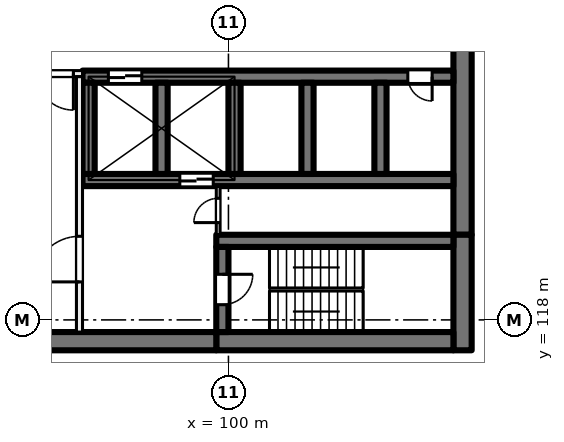
"""IFC4 building model, lengths in metres.
Left out: names, types, materials, properties, quantities, classifications, styles, units other than length and angle.
Written with IfcOpenShell. Run it as: python <this file> out.ifc"""

import sys

from ifc_helpers import new_model, si_unit, direction, frame, frame_2d, origin, place, context, subcontext, project, spatial, rectangle, extrude, element, fill, save


model = new_model("IFC4")
c1 = context("Model", 3, precision=1e-05, world=origin(), true_north=direction((0.0, 1.0)))
c2 = subcontext(c1, "Body", "Model", "MODEL_VIEW")
j1 = project(units=[si_unit("LENGTHUNIT", "METRE"), si_unit("PLANEANGLEUNIT", "RADIAN")], contexts=[c1])
p1 = place(None, origin())
s1 = spatial("IfcSite", under=j1, at=p1, CompositionType="ELEMENT")
p2 = place(p1, origin())
s2 = spatial("IfcBuilding", under=s1, at=p2, CompositionType="ELEMENT")
p3 = place(p2, frame((0.0, 0.0, 55.5)))
s3 = spatial("IfcBuildingStorey", under=s2, at=p3, CompositionType="ELEMENT", Elevation=55.5)
p4 = place(p3, frame((107.7, 135.2, 0.0), z_axis=(0.0, 0.0, 1.0), x_axis=(0.0, -1.0, 0.0)))
e1 = element("IfcWall", 1, at=p4, inside=s3, PredefinedType="SHEAR", context=c2, shape_type="SweptSolid", body=[
    extrude(rectangle(XDim=14.4, YDim=0.6, at=frame_2d((7.2, 0.0))), origin(), (0.0, 0.0, 1.0), 4.0),
])
p5 = place(p3, frame((107.7, 120.8, 0.0), z_axis=(0.0, 0.0, 1.0), x_axis=(0.0, -1.0, 0.0)))
e2 = element("IfcWall", 2, at=p5, inside=s3, PredefinedType="SHEAR", context=c2, shape_type="SweptSolid", body=[
    extrude(rectangle(XDim=3.8, YDim=0.6, at=frame_2d((1.9, 0.0))), origin(), (0.0, 0.0, 1.0), 4.0),
])
p6 = place(p3, frame((107.4, 117.3, 0.0), z_axis=(0.0, 0.0, 1.0), x_axis=(-1.0, 0.0, 0.0)))
e3 = element("IfcWall", 3, at=p6, inside=s3, PredefinedType="SHEAR", context=c2, shape_type="SweptSolid", body=[
    extrude(rectangle(XDim=7.8, YDim=0.6, at=frame_2d((3.9, 0.0))), origin(), (0.0, 0.0, 1.0), 4.0),
])
p7 = place(p3, frame((99.6, 117.3, 0.0), z_axis=(0.0, 0.0, 1.0), x_axis=(-1.0, 0.0, 0.0)))
e4 = element("IfcWall", 4, at=p7, inside=s3, PredefinedType="SHEAR", context=c2, shape_type="SweptSolid", body=[
    extrude(rectangle(XDim=8.9, YDim=0.6, at=frame_2d((4.45, 0.0))), origin(), (0.0, 0.0, 1.0), 4.0),
])
p8 = place(p3, frame((107.4, 120.6, 0.0), z_axis=(0.0, 0.0, 1.0), x_axis=(-1.0, 0.0, 0.0)))
e5 = element("IfcWall", 5, at=p8, inside=s3, PredefinedType="SHEAR", context=c2, shape_type="SweptSolid", body=[
    extrude(rectangle(XDim=7.8, YDim=0.4, at=frame_2d((3.9, 0.0))), origin(), (0.0, 0.0, 1.0), 4.0),
])
p9 = place(p3, frame((99.8, 120.4, 0.0), z_axis=(0.0, 0.0, 1.0), x_axis=(0.0, -1.0, 0.0)))
e6 = element("IfcWall", 6, at=p9, inside=s3, PredefinedType="SHEAR", context=c2, shape_type="SweptSolid", body=[
    extrude(rectangle(XDim=2.8, YDim=0.4, at=frame_2d((1.4, 0.0))), origin(), (0.0, 0.0, 1.0), 4.0),
])
p10 = place(p9, frame((0.9, 0.0, 0.0)))
e7 = element("IfcOpeningElement", 7, at=p10, cuts=e6, PredefinedType="OPENING", context=c2, shape_type="SweptSolid", body=[
    extrude(rectangle(XDim=1.0, YDim=2.1, at=frame_2d((0.5, 1.05))), frame((0.0, 0.21, 0.0), z_axis=(0.0, -1.0, 0.0), x_axis=(1.0, 0.0, 0.0)), (0.0, 0.0, 1.0), 0.42),
])
p11 = place(p3, frame((107.4, 126.0, 0.0), z_axis=(0.0, 0.0, 1.0), x_axis=(-1.0, 0.0, 0.0)))
e8 = element("IfcWall", 8, at=p11, inside=s3, PredefinedType="SHEAR", context=c2, shape_type="SweptSolid", body=[
    extrude(rectangle(XDim=12.2, YDim=0.4, at=frame_2d((6.1, 0.0))), origin(), (0.0, 0.0, 1.0), 4.0),
])
p12 = place(p11, frame((10.25, 0.0, 0.0)))
e9 = element("IfcOpeningElement", 9, at=p12, cuts=e8, PredefinedType="OPENING", context=c2, shape_type="SweptSolid", body=[
    extrude(rectangle(XDim=1.1, YDim=2.1, at=frame_2d((0.55, 1.05))), frame((0.0, 0.21, 0.0), z_axis=(0.0, -1.0, 0.0), x_axis=(1.0, 0.0, 0.0)), (0.0, 0.0, 1.0), 0.42),
])
p13 = place(p11, frame((0.7, 0.0, 0.0)))
e10 = element("IfcOpeningElement", 10, at=p13, cuts=e8, PredefinedType="OPENING", context=c2, shape_type="SweptSolid", body=[
    extrude(rectangle(XDim=0.8, YDim=2.1, at=frame_2d((0.4, 1.05))), frame((0.0, 0.21, 0.0), z_axis=(0.0, -1.0, 0.0), x_axis=(1.0, 0.0, 0.0)), (0.0, 0.0, 1.0), 0.42),
])
p14 = place(p3, frame((107.4, 122.6, 0.0), z_axis=(0.0, 0.0, 1.0), x_axis=(-1.0, 0.0, 0.0)))
e11 = element("IfcWall", 11, at=p14, inside=s3, PredefinedType="SHEAR", context=c2, shape_type="SweptSolid", body=[
    extrude(rectangle(XDim=12.2, YDim=0.4, at=frame_2d((6.1, 0.0))), origin(), (0.0, 0.0, 1.0), 4.0),
])
p15 = place(p14, frame((7.9, 0.0, 0.0)))
e12 = element("IfcOpeningElement", 12, at=p15, cuts=e11, PredefinedType="OPENING", context=c2, shape_type="SweptSolid", body=[
    extrude(rectangle(XDim=1.1, YDim=2.1, at=frame_2d((0.55, 1.05))), frame((0.0, 0.21, 0.0), z_axis=(0.0, -1.0, 0.0), x_axis=(1.0, 0.0, 0.0)), (0.0, 0.0, 1.0), 0.42),
])
for number, where, z_axis, x_axis in (
    (13, (105.0, 125.8, 0.0), (0.0, 0.0, 1.0), (0.0, -1.0, 0.0)),
    (14, (102.6, 125.8, 0.0), (0.0, 0.0, 1.0), (0.0, -1.0, 0.0)),
    (15, (100.2, 125.8, 0.0), (0.0, 0.0, 1.0), (0.0, -1.0, 0.0)),
    (16, (97.8, 125.8, 0.0), (0.0, 0.0, 1.0), (0.0, -1.0, 0.0)),
    (17, (95.4, 125.8, 0.0), (0.0, 0.0, 1.0), (0.0, -1.0, 0.0)),
):
    element("IfcWall", number, at=place(p3, frame(where, z_axis=z_axis, x_axis=x_axis)), inside=s3, PredefinedType="SHEAR", context=c2, shape_type="SweptSolid", body=[
        extrude(rectangle(XDim=3.0, YDim=0.4, at=frame_2d((1.5, 0.0))), origin(), (0.0, 0.0, 1.0), 4.0),
    ])
p16 = place(p3, frame((95.2, 126.1, 0.0), z_axis=(0.0, 0.0, 1.0), x_axis=(-1.0, 0.0, 0.0)))
e18 = element("IfcWall", 18, at=p16, inside=s3, PredefinedType="PARTITIONING", context=c2, shape_type="SweptSolid", body=[
    extrude(rectangle(XDim=3.8, YDim=0.2, at=frame_2d((1.9, 0.0))), origin(), (0.0, 0.0, 1.0), 3.625),
])
p17 = place(p16, frame((0.3, 0.0, 0.0)))
e19 = element("IfcOpeningElement", 19, at=p17, cuts=e18, PredefinedType="OPENING", context=c2, shape_type="SweptSolid", body=[
    extrude(rectangle(XDim=1.2, YDim=2.1, at=frame_2d((0.6, 1.05))), frame((0.0, 0.11, 0.0), z_axis=(0.0, -1.0, 0.0), x_axis=(1.0, 0.0, 0.0)), (0.0, 0.0, 1.0), 0.22),
])
p18 = place(p3, frame((95.1, 117.6, 0.0), z_axis=(0.0, 0.0, 1.0), x_axis=(0.0, 1.0, 0.0)))
e20 = element("IfcWall", 20, at=p18, inside=s3, PredefinedType="PARTITIONING", context=c2, shape_type="SweptSolid", body=[
    extrude(rectangle(XDim=8.4, YDim=0.2, at=frame_2d((4.2, 0.0))), origin(), (0.0, 0.0, 1.0), 3.625),
])
p19 = place(p18, frame((1.65, 0.0, 0.0)))
e21 = element("IfcOpeningElement", 21, at=p19, cuts=e20, PredefinedType="OPENING", context=c2, shape_type="SweptSolid", body=[
    extrude(rectangle(XDim=1.5, YDim=2.1, at=frame_2d((0.75, 1.05))), frame((0.0, 0.11, 0.0), z_axis=(0.0, -1.0, 0.0), x_axis=(1.0, 0.0, 0.0)), (0.0, 0.0, 1.0), 0.22),
])
p20 = place(p3, frame((99.663, 120.8, 0.0), z_axis=(0.0, 0.0, 1.0), x_axis=(0.0, 1.0, 0.0)))
e22 = element("IfcWall", 22, at=p20, inside=s3, PredefinedType="PARTITIONING", context=c2, shape_type="SweptSolid", body=[
    extrude(rectangle(XDim=1.6, YDim=0.125, at=frame_2d((0.8, 0.0))), origin(), (0.0, 0.0, 1.0), 3.625),
])
p21 = place(p20, frame((0.4, 0.0, 0.0)))
e23 = element("IfcOpeningElement", 23, at=p21, cuts=e22, PredefinedType="OPENING", context=c2, shape_type="SweptSolid", body=[
    extrude(rectangle(XDim=0.8, YDim=2.1, at=frame_2d((0.4, 1.05))), frame((0.0, 0.073, 0.0), z_axis=(0.0, -1.0, 0.0), x_axis=(1.0, 0.0, 0.0)), (0.0, 0.0, 1.0), 0.145),
])
p22 = place(p12, origin())
e24 = element("IfcDoor", 24, at=p22, inside=s3, OperationType="DOUBLE_DOOR_SLIDING", PredefinedType="DOOR", context=c2, shape_type="SweptSolid", body=[
    extrude(rectangle(XDim=1.1, YDim=2.1, at=frame_2d((0.55, 1.05))), frame((0.0, 0.025, 0.0), z_axis=(0.0, -1.0, 0.0), x_axis=(1.0, 0.0, 0.0)), (0.0, 0.0, 1.0), 0.05),
])
fill(e9, e24)
p23 = place(p13, origin())
e25 = element("IfcDoor", 25, at=p23, inside=s3, OperationType="SINGLE_SWING_LEFT", PredefinedType="DOOR", context=c2, shape_type="SweptSolid", body=[
    extrude(rectangle(XDim=0.8, YDim=2.1, at=frame_2d((0.4, 1.05))), frame((0.0, 0.025, 0.0), z_axis=(0.0, -1.0, 0.0), x_axis=(1.0, 0.0, 0.0)), (0.0, 0.0, 1.0), 0.05),
])
fill(e10, e25)
p24 = place(p17, origin())
e26 = element("IfcDoor", 26, at=p24, inside=s3, OperationType="DOUBLE_DOOR_SINGLE_SWING", PredefinedType="DOOR", context=c2, shape_type="SweptSolid", body=[
    extrude(rectangle(XDim=1.2, YDim=2.1, at=frame_2d((0.6, 1.05))), frame((0.0, 0.025, 0.0), z_axis=(0.0, -1.0, 0.0), x_axis=(1.0, 0.0, 0.0)), (0.0, 0.0, 1.0), 0.05),
])
fill(e19, e26)
p25 = place(p19, origin())
e27 = element("IfcDoor", 27, at=p25, inside=s3, OperationType="DOUBLE_DOOR_SINGLE_SWING", PredefinedType="DOOR", context=c2, shape_type="SweptSolid", body=[
    extrude(rectangle(XDim=1.5, YDim=2.1, at=frame_2d((0.75, 1.05))), frame((0.0, 0.025, 0.0), z_axis=(0.0, -1.0, 0.0), x_axis=(1.0, 0.0, 0.0)), (0.0, 0.0, 1.0), 0.05),
])
fill(e21, e27)
p26 = place(p10, origin())
e28 = element("IfcDoor", 28, at=p26, inside=s3, OperationType="SINGLE_SWING_LEFT", PredefinedType="DOOR", context=c2, shape_type="SweptSolid", body=[
    extrude(rectangle(XDim=1.0, YDim=2.1, at=frame_2d((0.5, 1.05))), frame((0.0, 0.025, 0.0), z_axis=(0.0, -1.0, 0.0), x_axis=(1.0, 0.0, 0.0)), (0.0, 0.0, 1.0), 0.05),
])
fill(e7, e28)
p27 = place(p21, origin())
e29 = element("IfcDoor", 29, at=p27, inside=s3, OperationType="SINGLE_SWING_RIGHT", PredefinedType="DOOR", context=c2, shape_type="SweptSolid", body=[
    extrude(rectangle(XDim=0.8, YDim=2.1, at=frame_2d((0.4, 1.05))), frame((0.0, 0.025, 0.0), z_axis=(0.0, -1.0, 0.0), x_axis=(1.0, 0.0, 0.0)), (0.0, 0.0, 1.0), 0.05),
])
fill(e23, e29)
p28 = place(p15, origin())
e30 = element("IfcDoor", 30, at=p28, inside=s3, OperationType="DOUBLE_DOOR_SLIDING", PredefinedType="DOOR", context=c2, shape_type="SweptSolid", body=[
    extrude(rectangle(XDim=1.1, YDim=2.1, at=frame_2d((0.55, 1.05))), frame((0.0, 0.025, 0.0), z_axis=(0.0, -1.0, 0.0), x_axis=(1.0, 0.0, 0.0)), (0.0, 0.0, 1.0), 0.05),
])
fill(e12, e30)
save(model, sys.argv[1])
